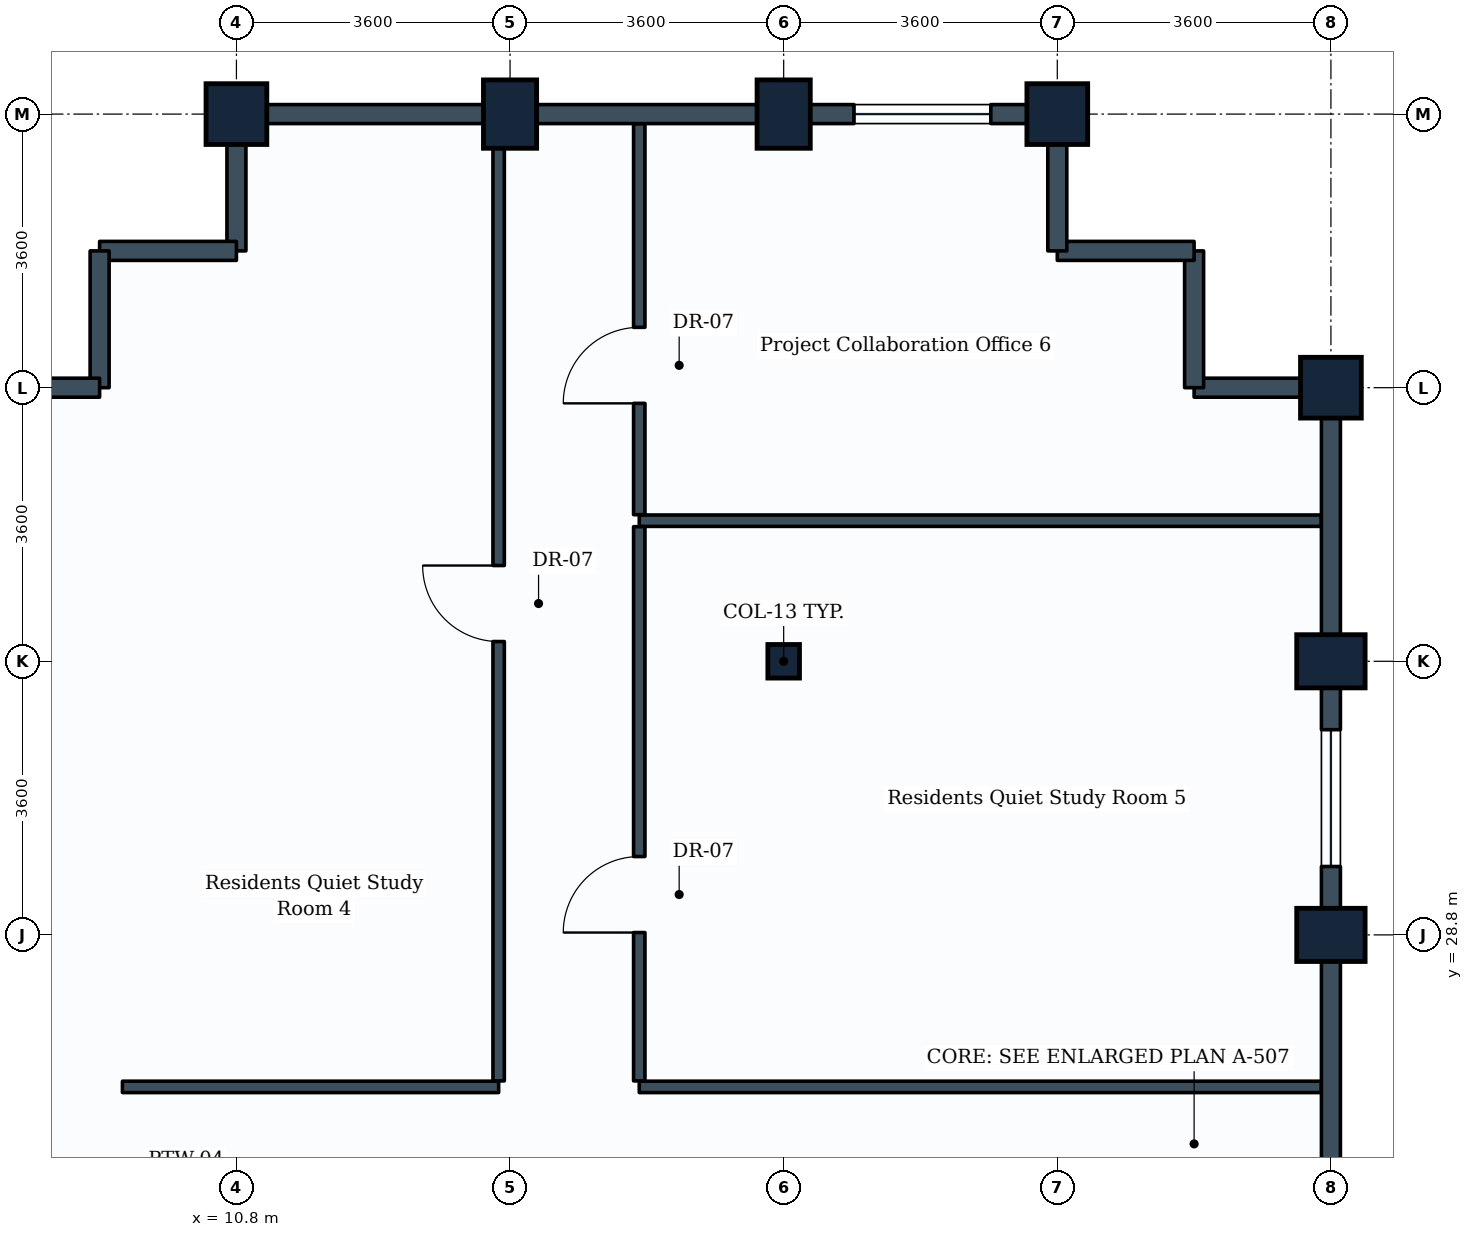
"""IFC4 building model, lengths in metres.
Left out: names, types, materials, properties, quantities, classifications, styles, units other than length and angle.
Written with IfcOpenShell. Run it as: python <this file> out.ifc"""

import sys

from ifc_helpers import new_model, si_unit, direction, frame, frame_2d, origin, origin_2d, place, context, subcontext, project, spatial, rectangle, i_section, extrude, element, fill, save


model = new_model("IFC4")
c1 = context("Model", 3, precision=1e-05, world=origin(), true_north=direction((0.0, 1.0)))
c2 = subcontext(c1, "Body", "Model", "MODEL_VIEW")
j1 = project(units=[si_unit("LENGTHUNIT", "METRE"), si_unit("PLANEANGLEUNIT", "RADIAN")], contexts=[c1])
p1 = place(None, origin())
s1 = spatial("IfcSite", under=j1, at=p1, CompositionType="ELEMENT")
p2 = place(p1, origin())
s2 = spatial("IfcBuilding", under=s1, at=p2, CompositionType="ELEMENT")
p3 = place(p2, frame((0.0, 0.0, 197.6)))
s3 = spatial("IfcBuildingStorey", under=s2, at=p3, CompositionType="ELEMENT", Elevation=197.6)
p4 = place(p3, frame((10.8, 39.6, 0.0), z_axis=(0.0, 0.0, 1.0), x_axis=(1.0, 0.0, 0.0)))
e1 = element("IfcColumn", 1, at=p4, inside=s3, PredefinedType="COLUMN", context=c2, shape_type="SweptSolid", body=[
    extrude(rectangle(XDim=0.8, YDim=0.8, at=origin_2d()), origin(), (0.0, 0.0, 1.0), 3.8),
])
p5 = place(p3, frame((14.4, 39.6, 0.0), z_axis=(0.0, 0.0, 1.0), x_axis=(1.0, 0.0, 0.0)))
e2 = element("IfcColumn", 2, at=p5, inside=s3, PredefinedType="COLUMN", context=c2, shape_type="SweptSolid", body=[
    extrude(rectangle(XDim=0.7, YDim=0.9, at=origin_2d()), origin(), (0.0, 0.0, 1.0), 3.8),
])
p6 = place(p3, frame((18.0, 32.4, 0.0), z_axis=(0.0, 0.0, 1.0), x_axis=(1.0, 0.0, 0.0)))
e3 = element("IfcColumn", 3, at=p6, inside=s3, PredefinedType="COLUMN", context=c2, shape_type="SweptSolid", body=[
    extrude(i_section(OverallWidth=0.416, OverallDepth=0.442, WebThickness=0.025, FlangeThickness=0.041, FilletRadius=0.015, at=origin_2d()), origin(), (0.0, 0.0, 1.0), 3.8),
])
p7 = place(p3, frame((18.0, 39.6, 0.0), z_axis=(0.0, 0.0, 1.0), x_axis=(1.0, 0.0, 0.0)))
e4 = element("IfcColumn", 4, at=p7, inside=s3, PredefinedType="COLUMN", context=c2, shape_type="SweptSolid", body=[
    extrude(rectangle(XDim=0.7, YDim=0.9, at=origin_2d()), origin(), (0.0, 0.0, 1.0), 3.8),
])
p8 = place(p3, frame((21.6, 39.6, 0.0), z_axis=(0.0, 0.0, 1.0), x_axis=(1.0, 0.0, 0.0)))
e5 = element("IfcColumn", 5, at=p8, inside=s3, PredefinedType="COLUMN", context=c2, shape_type="SweptSolid", body=[
    extrude(rectangle(XDim=0.8, YDim=0.8, at=origin_2d()), origin(), (0.0, 0.0, 1.0), 3.8),
])
for number, where, z_axis, x_axis in (
    (6, (25.2, 28.8, 0.0), (0.0, 0.0, 1.0), (0.0, 1.0, 0.0)),
    (7, (25.2, 32.4, 0.0), (0.0, 0.0, 1.0), (0.0, 1.0, 0.0)),
):
    element("IfcColumn", number, at=place(p3, frame(where, z_axis=z_axis, x_axis=x_axis)), inside=s3, PredefinedType="COLUMN", context=c2, shape_type="SweptSolid", body=[
        extrude(rectangle(XDim=0.7, YDim=0.9, at=origin_2d()), origin(), (0.0, 0.0, 1.0), 3.8),
    ])
p9 = place(p3, frame((25.2, 36.0, 0.0), z_axis=(0.0, 0.0, 1.0), x_axis=(0.0, 1.0, 0.0)))
e8 = element("IfcColumn", 8, at=p9, inside=s3, PredefinedType="COLUMN", context=c2, shape_type="SweptSolid", body=[
    extrude(rectangle(XDim=0.8, YDim=0.8, at=origin_2d()), origin(), (0.0, 0.0, 1.0), 3.8),
])
p10 = place(p3, frame((25.2, 25.2, 0.0), z_axis=(0.0, 0.0, 1.0), x_axis=(0.0, 1.0, 0.0)))
e9 = element("IfcWall", 9, at=p10, inside=s3, PredefinedType="STANDARD", context=c2, shape_type="SweptSolid", body=[
    extrude(rectangle(XDim=3.6, YDim=0.25, at=frame_2d((1.8, 0.0))), origin(), (0.0, 0.0, 1.0), 2.93),
])
p11 = place(p3, frame((25.2, 28.8, 0.0), z_axis=(0.0, 0.0, 1.0), x_axis=(0.0, 1.0, 0.0)))
e10 = element("IfcWall", 10, at=p11, inside=s3, PredefinedType="STANDARD", context=c2, shape_type="SweptSolid", body=[
    extrude(rectangle(XDim=3.6, YDim=0.25, at=frame_2d((1.8, 0.0))), origin(), (0.0, 0.0, 1.0), 2.93),
])
p12 = place(p11, frame((0.9, 0.0, 0.85)))
e11 = element("IfcOpeningElement", 11, at=p12, cuts=e10, PredefinedType="OPENING", context=c2, shape_type="SweptSolid", body=[
    extrude(rectangle(XDim=1.8, YDim=1.35, at=frame_2d((0.9, 0.675))), frame((0.0, 0.135, 0.0), z_axis=(0.0, -1.0, 0.0), x_axis=(1.0, 0.0, 0.0)), (0.0, 0.0, 1.0), 0.27),
])
p13 = place(p3, frame((25.2, 32.4, 0.0), z_axis=(0.0, 0.0, 1.0), x_axis=(0.0, 1.0, 0.0)))
e12 = element("IfcWall", 12, at=p13, inside=s3, PredefinedType="STANDARD", context=c2, shape_type="SweptSolid", body=[
    extrude(rectangle(XDim=3.6, YDim=0.25, at=frame_2d((1.8, 0.0))), origin(), (0.0, 0.0, 1.0), 2.93),
])
p14 = place(p3, frame((23.4, 36.0, 0.0), z_axis=(0.0, 0.0, 1.0), x_axis=(1.0, 0.0, 0.0)))
e13 = element("IfcWall", 13, at=p14, inside=s3, PredefinedType="STANDARD", context=c2, shape_type="SweptSolid", body=[
    extrude(rectangle(XDim=1.8, YDim=0.25, at=frame_2d((0.9, 0.0))), origin(), (0.0, 0.0, 1.0), 2.93),
])
p15 = place(p3, frame((23.4, 36.0, 0.0), z_axis=(0.0, 0.0, 1.0), x_axis=(0.0, 1.0, 0.0)))
e14 = element("IfcWall", 14, at=p15, inside=s3, PredefinedType="STANDARD", context=c2, shape_type="SweptSolid", body=[
    extrude(rectangle(XDim=1.8, YDim=0.25, at=frame_2d((0.9, 0.0))), origin(), (0.0, 0.0, 1.0), 3.535),
])
p16 = place(p3, frame((21.6, 37.8, 0.0), z_axis=(0.0, 0.0, 1.0), x_axis=(1.0, 0.0, 0.0)))
e15 = element("IfcWall", 15, at=p16, inside=s3, PredefinedType="STANDARD", context=c2, shape_type="SweptSolid", body=[
    extrude(rectangle(XDim=1.8, YDim=0.25, at=frame_2d((0.9, 0.0))), origin(), (0.0, 0.0, 1.0), 3.535),
])
p17 = place(p3, frame((21.6, 37.8, 0.0), z_axis=(0.0, 0.0, 1.0), x_axis=(0.0, 1.0, 0.0)))
e16 = element("IfcWall", 16, at=p17, inside=s3, PredefinedType="STANDARD", context=c2, shape_type="SweptSolid", body=[
    extrude(rectangle(XDim=1.8, YDim=0.25, at=frame_2d((0.9, 0.0))), origin(), (0.0, 0.0, 1.0), 2.93),
])
p18 = place(p3, frame((18.0, 39.6, 0.0), z_axis=(0.0, 0.0, 1.0), x_axis=(1.0, 0.0, 0.0)))
e17 = element("IfcWall", 17, at=p18, inside=s3, PredefinedType="STANDARD", context=c2, shape_type="SweptSolid", body=[
    extrude(rectangle(XDim=3.6, YDim=0.25, at=frame_2d((1.8, 0.0))), origin(), (0.0, 0.0, 1.0), 2.93),
])
p19 = place(p18, frame((0.925, 0.0, 0.85)))
e18 = element("IfcOpeningElement", 18, at=p19, cuts=e17, PredefinedType="OPENING", context=c2, shape_type="SweptSolid", body=[
    extrude(rectangle(XDim=1.8, YDim=1.35, at=frame_2d((0.9, 0.675))), frame((0.0, 0.135, 0.0), z_axis=(0.0, -1.0, 0.0), x_axis=(1.0, 0.0, 0.0)), (0.0, 0.0, 1.0), 0.27),
])
p20 = place(p3, frame((14.4, 39.6, 0.0), z_axis=(0.0, 0.0, 1.0), x_axis=(1.0, 0.0, 0.0)))
e19 = element("IfcWall", 19, at=p20, inside=s3, PredefinedType="STANDARD", context=c2, shape_type="SweptSolid", body=[
    extrude(rectangle(XDim=3.6, YDim=0.25, at=frame_2d((1.8, 0.0))), origin(), (0.0, 0.0, 1.0), 2.93),
])
p21 = place(p3, frame((10.8, 39.6, 0.0), z_axis=(0.0, 0.0, 1.0), x_axis=(1.0, 0.0, 0.0)))
e20 = element("IfcWall", 20, at=p21, inside=s3, PredefinedType="STANDARD", context=c2, shape_type="SweptSolid", body=[
    extrude(rectangle(XDim=3.6, YDim=0.25, at=frame_2d((1.8, 0.0))), origin(), (0.0, 0.0, 1.0), 2.93),
])
p22 = place(p3, frame((10.8, 37.8, 0.0), z_axis=(0.0, 0.0, 1.0), x_axis=(0.0, 1.0, 0.0)))
e21 = element("IfcWall", 21, at=p22, inside=s3, PredefinedType="STANDARD", context=c2, shape_type="SweptSolid", body=[
    extrude(rectangle(XDim=1.8, YDim=0.25, at=frame_2d((0.9, 0.0))), origin(), (0.0, 0.0, 1.0), 2.93),
])
for number, where, z_axis, x_axis in (
    (22, (9.0, 37.8, 0.0), (0.0, 0.0, 1.0), (1.0, 0.0, 0.0)),
    (23, (9.0, 36.0, 0.0), (0.0, 0.0, 1.0), (0.0, 1.0, 0.0)),
):
    element("IfcWall", number, at=place(p3, frame(where, z_axis=z_axis, x_axis=x_axis)), inside=s3, PredefinedType="STANDARD", context=c2, shape_type="SweptSolid", body=[
        extrude(rectangle(XDim=1.8, YDim=0.25, at=frame_2d((0.9, 0.0))), origin(), (0.0, 0.0, 1.0), 3.535),
    ])
p23 = place(p3, frame((7.2, 36.0, 0.0), z_axis=(0.0, 0.0, 1.0), x_axis=(1.0, 0.0, 0.0)))
e24 = element("IfcWall", 24, at=p23, inside=s3, PredefinedType="STANDARD", context=c2, shape_type="SweptSolid", body=[
    extrude(rectangle(XDim=1.8, YDim=0.25, at=frame_2d((0.9, 0.0))), origin(), (0.0, 0.0, 1.0), 2.93),
])
p24 = place(p3, frame((9.3, 26.8, 0.0), z_axis=(0.0, 0.0, 1.0), x_axis=(1.0, 0.0, 0.0)))
e25 = element("IfcWall", 25, at=p24, inside=s3, PredefinedType="PARTITIONING", context=c2, shape_type="SweptSolid", body=[
    extrude(rectangle(XDim=4.95, YDim=0.15, at=frame_2d((2.475, 0.0))), origin(), (0.0, 0.0, 1.0), 3.535),
])
p25 = place(p3, frame((14.25, 26.879, 0.0), z_axis=(0.0, 0.0, 1.0), x_axis=(0.0, 1.0, 0.0)))
e26 = element("IfcWall", 26, at=p25, inside=s3, PredefinedType="PARTITIONING", context=c2, shape_type="SweptSolid", body=[
    extrude(rectangle(XDim=12.592, YDim=0.15, at=frame_2d((6.296, 0.0))), origin(), (0.0, 0.0, 1.0), 2.93),
])
p26 = place(p25, frame((5.781, 0.0, 0.0)))
e27 = element("IfcOpeningElement", 27, at=p26, cuts=e26, PredefinedType="OPENING", context=c2, shape_type="SweptSolid", body=[
    extrude(rectangle(XDim=1.0, YDim=2.1, at=frame_2d((0.5, 1.05))), frame((0.0, 0.085, 0.0), z_axis=(0.0, -1.0, 0.0), x_axis=(1.0, 0.0, 0.0)), (0.0, 0.0, 1.0), 0.17),
])
for number, where, z_axis, x_axis in (
    (28, (16.1, 26.8, 0.0), (0.0, 0.0, 1.0), (1.0, 0.0, 0.0)),
    (29, (16.1, 34.25, 0.0), (0.0, 0.0, 1.0), (1.0, 0.0, 0.0)),
):
    element("IfcWall", number, at=place(p3, frame(where, z_axis=z_axis, x_axis=x_axis)), inside=s3, PredefinedType="PARTITIONING", context=c2, shape_type="SweptSolid", body=[
        extrude(rectangle(XDim=8.971, YDim=0.15, at=frame_2d((4.485, 0.0))), origin(), (0.0, 0.0, 1.0), 2.93),
    ])
p27 = place(p3, frame((16.1, 26.879, 0.0), z_axis=(0.0, 0.0, 1.0), x_axis=(0.0, 1.0, 0.0)))
e30 = element("IfcWall", 30, at=p27, inside=s3, PredefinedType="PARTITIONING", context=c2, shape_type="SweptSolid", body=[
    extrude(rectangle(XDim=7.292, YDim=0.15, at=frame_2d((3.646, 0.0))), origin(), (0.0, 0.0, 1.0), 3.17),
])
p28 = place(p27, frame((1.952, 0.0, 0.0)))
e31 = element("IfcOpeningElement", 31, at=p28, cuts=e30, PredefinedType="OPENING", context=c2, shape_type="SweptSolid", body=[
    extrude(rectangle(XDim=1.0, YDim=2.1, at=frame_2d((0.5, 1.05))), frame((0.0, 0.085, 0.0), z_axis=(0.0, -1.0, 0.0), x_axis=(1.0, 0.0, 0.0)), (0.0, 0.0, 1.0), 0.17),
])
p29 = place(p3, frame((16.1, 34.329, 0.0), z_axis=(0.0, 0.0, 1.0), x_axis=(0.0, 1.0, 0.0)))
e32 = element("IfcWall", 32, at=p29, inside=s3, PredefinedType="PARTITIONING", context=c2, shape_type="SweptSolid", body=[
    extrude(rectangle(XDim=5.142, YDim=0.15, at=frame_2d((2.571, 0.0))), origin(), (0.0, 0.0, 1.0), 2.93),
])
p30 = place(p29, frame((1.465, 0.0, 0.0)))
e33 = element("IfcOpeningElement", 33, at=p30, cuts=e32, PredefinedType="OPENING", context=c2, shape_type="SweptSolid", body=[
    extrude(rectangle(XDim=1.0, YDim=2.1, at=frame_2d((0.5, 1.05))), frame((0.0, 0.085, 0.0), z_axis=(0.0, -1.0, 0.0), x_axis=(1.0, 0.0, 0.0)), (0.0, 0.0, 1.0), 0.17),
])
p31 = place(p12, origin())
e34 = element("IfcWindow", 34, at=p31, inside=s3, PartitioningType="SINGLE_PANEL", PredefinedType="WINDOW", context=c2, shape_type="SweptSolid", body=[
    extrude(rectangle(XDim=1.8, YDim=1.35, at=frame_2d((0.9, 0.675))), frame((0.0, 0.03, 0.0), z_axis=(0.0, -1.0, 0.0), x_axis=(1.0, 0.0, 0.0)), (0.0, 0.0, 1.0), 0.06),
])
fill(e11, e34)
p32 = place(p19, origin())
e35 = element("IfcWindow", 35, at=p32, inside=s3, PartitioningType="SINGLE_PANEL", PredefinedType="WINDOW", context=c2, shape_type="SweptSolid", body=[
    extrude(rectangle(XDim=1.8, YDim=1.35, at=frame_2d((0.9, 0.675))), frame((0.0, 0.03, 0.0), z_axis=(0.0, -1.0, 0.0), x_axis=(1.0, 0.0, 0.0)), (0.0, 0.0, 1.0), 0.06),
])
fill(e18, e35)
p33 = place(p26, origin())
e36 = element("IfcDoor", 36, at=p33, inside=s3, OperationType="SINGLE_SWING_RIGHT", PredefinedType="DOOR", context=c2, shape_type="SweptSolid", body=[
    extrude(rectangle(XDim=1.0, YDim=2.1, at=frame_2d((0.5, 1.05))), frame((0.0, 0.025, 0.0), z_axis=(0.0, -1.0, 0.0), x_axis=(1.0, 0.0, 0.0)), (0.0, 0.0, 1.0), 0.05),
])
fill(e27, e36)
p34 = place(p28, origin())
e37 = element("IfcDoor", 37, at=p34, inside=s3, OperationType="SINGLE_SWING_LEFT", PredefinedType="DOOR", context=c2, shape_type="SweptSolid", body=[
    extrude(rectangle(XDim=1.0, YDim=2.1, at=frame_2d((0.5, 1.05))), frame((0.0, 0.025, 0.0), z_axis=(0.0, -1.0, 0.0), x_axis=(1.0, 0.0, 0.0)), (0.0, 0.0, 1.0), 0.05),
])
fill(e31, e37)
p35 = place(p30, origin())
e38 = element("IfcDoor", 38, at=p35, inside=s3, OperationType="SINGLE_SWING_LEFT", PredefinedType="DOOR", context=c2, shape_type="SweptSolid", body=[
    extrude(rectangle(XDim=1.0, YDim=2.1, at=frame_2d((0.5, 1.05))), frame((0.0, 0.025, 0.0), z_axis=(0.0, -1.0, 0.0), x_axis=(1.0, 0.0, 0.0)), (0.0, 0.0, 1.0), 0.05),
])
fill(e33, e38)
save(model, sys.argv[1])
